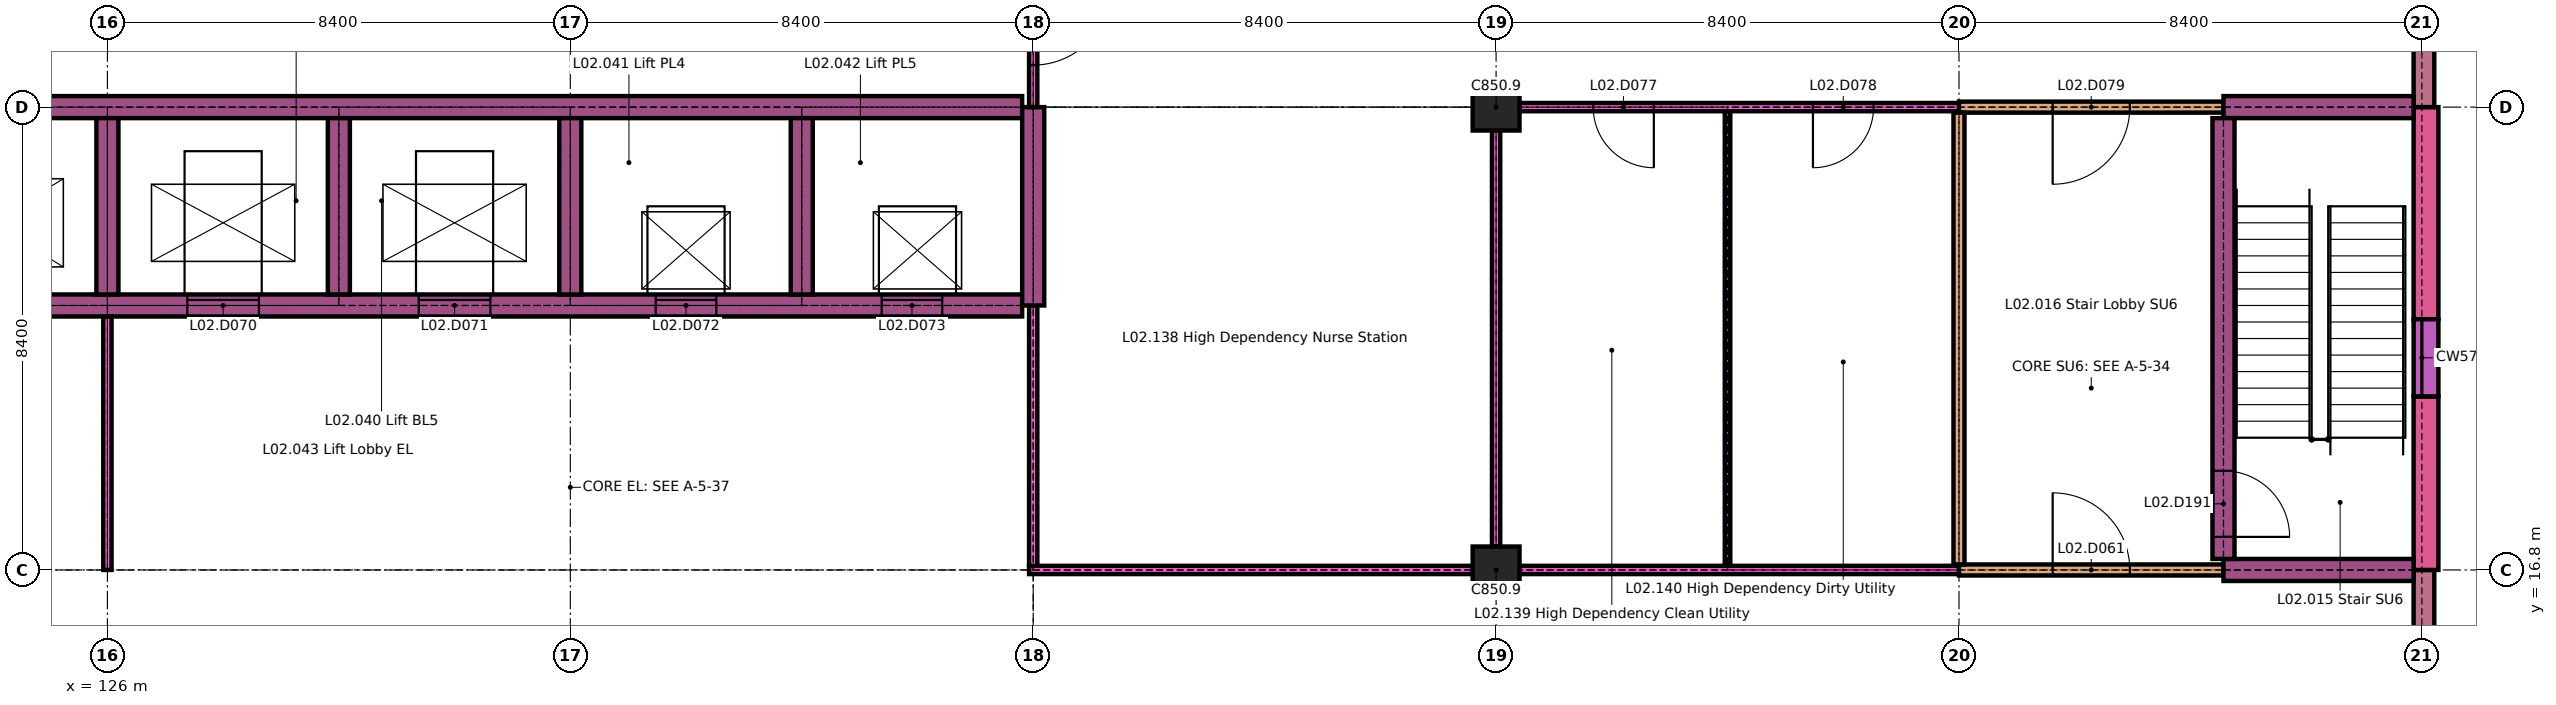
"""IFC4 building model, lengths in metres.
Left out: names, types, materials, properties, quantities, classifications, styles, units other than length and angle.
Written with IfcOpenShell. Run it as: python <this file> out.ifc"""

import sys

from ifc_helpers import new_model, si_unit, direction, frame, frame_2d, origin, origin_2d, place, context, subcontext, project, spatial, rectangle, extrude, element, fill, save


model = new_model("IFC4")
c1 = context("Model", 3, precision=1e-05, world=origin(), true_north=direction((0.0, 1.0)))
c2 = subcontext(c1, "Body", "Model", "MODEL_VIEW")
j1 = project(units=[si_unit("LENGTHUNIT", "METRE"), si_unit("PLANEANGLEUNIT", "RADIAN")], contexts=[c1])
p1 = place(None, origin())
s1 = spatial("IfcSite", under=j1, at=p1, CompositionType="ELEMENT")
p2 = place(p1, origin())
s2 = spatial("IfcBuilding", under=s1, at=p2, CompositionType="ELEMENT")
p3 = place(p2, frame((0.0, 0.0, 8.4)))
s3 = spatial("IfcBuildingStorey", under=s2, at=p3, CompositionType="ELEMENT", Elevation=8.4)
for number, where, z_axis, x_axis in (
    (1, (151.2, 16.8, 0.0), (0.0, 0.0, 1.0), (1.0, 0.0, 0.0)),
    (2, (151.2, 25.2, 0.0), (0.0, 0.0, 1.0), (1.0, 0.0, 0.0)),
):
    element("IfcColumn", number, at=place(p3, frame(where, z_axis=z_axis, x_axis=x_axis)), inside=s3, PredefinedType="COLUMN", context=c2, shape_type="SweptSolid", body=[
        extrude(rectangle(XDim=0.85, YDim=0.85, at=origin_2d()), origin(), (0.0, 0.0, 1.0), 4.2),
    ])
p4 = place(p3, frame((168.038, 13.8, 0.0), z_axis=(0.0, 0.0, 1.0), x_axis=(0.0, 1.0, 0.0)))
e3 = element("IfcWall", 3, at=p4, inside=s3, PredefinedType="SOLIDWALL", context=c2, shape_type="SweptSolid", body=[
    extrude(rectangle(XDim=3.0, YDim=0.375, at=frame_2d((1.5, 0.0))), origin(), (0.0, 0.0, 1.0), 3.9),
])
p5 = place(p4, frame((0.45, 0.0, 0.9)))
e4 = element("IfcOpeningElement", 4, at=p5, cuts=e3, PredefinedType="OPENING", context=c2, shape_type="SweptSolid", body=[
    extrude(rectangle(XDim=0.9, YDim=2.1, at=frame_2d((0.45, 1.05))), frame((0.0, 0.198, 0.0), z_axis=(0.0, -1.0, 0.0), x_axis=(1.0, 0.0, 0.0)), (0.0, 0.0, 1.0), 0.395),
])
p6 = place(p3, frame((168.075, 16.8, 0.0), z_axis=(0.0, 0.0, 1.0), x_axis=(0.0, 1.0, 0.0)))
e5 = element("IfcWall", 5, at=p6, inside=s3, PredefinedType="SOLIDWALL", context=c2, shape_type="SweptSolid", body=[
    extrude(rectangle(XDim=3.15, YDim=0.45, at=frame_2d((1.575, 0.0))), origin(), (0.0, 0.0, 1.0), 4.2),
])
p7 = place(p3, frame((168.075, 21.35, 0.0), z_axis=(0.0, 0.0, 1.0), x_axis=(0.0, 1.0, 0.0)))
e6 = element("IfcWall", 6, at=p7, inside=s3, PredefinedType="SOLIDWALL", context=c2, shape_type="SweptSolid", body=[
    extrude(rectangle(XDim=3.85, YDim=0.45, at=frame_2d((1.925, 0.0))), origin(), (0.0, 0.0, 1.0), 4.2),
])
p8 = place(p3, frame((168.075, 19.95, 0.0), z_axis=(0.0, 0.0, 1.0), x_axis=(0.0, 1.0, 0.0)))
e7 = element("IfcWall", 7, at=p8, inside=s3, PredefinedType="SOLIDWALL", context=c2, shape_type="SweptSolid", body=[
    extrude(rectangle(XDim=1.4, YDim=0.45, at=frame_2d((0.7, 0.0))), origin(), (0.0, 0.0, 1.0), 0.6),
])
p9 = place(p3, frame((168.038, 25.2, 0.0), z_axis=(0.0, 0.0, 1.0), x_axis=(0.0, 1.0, 0.0)))
e8 = element("IfcWall", 8, at=p9, inside=s3, PredefinedType="SOLIDWALL", context=c2, shape_type="SweptSolid", body=[
    extrude(rectangle(XDim=3.0, YDim=0.375, at=frame_2d((1.5, 0.0))), origin(), (0.0, 0.0, 1.0), 3.9),
])
p10 = place(p9, frame((1.65, 0.0, 0.9)))
e9 = element("IfcOpeningElement", 9, at=p10, cuts=e8, PredefinedType="OPENING", context=c2, shape_type="SweptSolid", body=[
    extrude(rectangle(XDim=0.9, YDim=2.1, at=frame_2d((0.45, 1.05))), frame((0.0, 0.198, 0.0), z_axis=(0.0, -1.0, 0.0), x_axis=(1.0, 0.0, 0.0)), (0.0, 0.0, 1.0), 0.395),
])
p11 = place(p3, frame((142.725, 16.8, 0.0), z_axis=(0.0, 0.0, 1.0), x_axis=(1.0, 0.0, 0.0)))
e10 = element("IfcWall", 10, at=p11, inside=s3, PredefinedType="PARTITIONING", context=c2, shape_type="SweptSolid", body=[
    extrude(rectangle(XDim=8.05, YDim=0.15, at=frame_2d((4.025, 0.0))), origin(), (0.0, 0.0, 1.0), 4.2),
])
p12 = place(p3, frame((151.625, 16.8, 0.0), z_axis=(0.0, 0.0, 1.0), x_axis=(1.0, 0.0, 0.0)))
e11 = element("IfcWall", 11, at=p12, inside=s3, PredefinedType="PARTITIONING", context=c2, shape_type="SweptSolid", body=[
    extrude(rectangle(XDim=7.975, YDim=0.15, at=frame_2d((3.988, 0.0))), origin(), (0.0, 0.0, 1.0), 4.2),
])
p13 = place(p3, frame((159.6, 16.8, 0.0), z_axis=(0.0, 0.0, 1.0), x_axis=(1.0, 0.0, 0.0)))
e12 = element("IfcWall", 12, at=p13, inside=s3, PredefinedType="PARTITIONING", context=c2, shape_type="SweptSolid", body=[
    extrude(rectangle(XDim=4.8, YDim=0.2, at=frame_2d((2.4, 0.0))), origin(), (0.0, 0.0, 1.0), 4.2),
])
p14 = place(p13, frame((1.7, 0.0, 0.0)))
e13 = element("IfcOpeningElement", 13, at=p14, cuts=e12, PredefinedType="OPENING", context=c2, shape_type="SweptSolid", body=[
    extrude(rectangle(XDim=1.4, YDim=2.1, at=frame_2d((0.7, 1.05))), frame((0.0, 0.11, 0.0), z_axis=(0.0, -1.0, 0.0), x_axis=(1.0, 0.0, 0.0)), (0.0, 0.0, 1.0), 0.22),
])
p15 = place(p3, frame((164.4, 16.8, 0.0), z_axis=(0.0, 0.0, 1.0), x_axis=(1.0, 0.0, 0.0)))
e14 = element("IfcWall", 14, at=p15, inside=s3, PredefinedType="SHEAR", context=c2, shape_type="SweptSolid", body=[
    extrude(rectangle(XDim=3.45, YDim=0.4, at=frame_2d((1.725, 0.0))), origin(), (0.0, 0.0, 1.0), 4.2),
])
p16 = place(p3, frame((117.8, 21.6, 0.0), z_axis=(0.0, 0.0, 1.0), x_axis=(1.0, 0.0, 0.0)))
e15 = element("IfcWall", 15, at=p16, inside=s3, PredefinedType="SHEAR", context=c2, shape_type="SweptSolid", body=[
    extrude(rectangle(XDim=24.8, YDim=0.4, at=frame_2d((12.4, 0.0))), origin(), (0.0, 0.0, 1.0), 4.2),
])
p17 = place(p16, frame((1.35, 0.0, 0.0)))
e16 = element("IfcOpeningElement", 16, at=p17, cuts=e15, PredefinedType="OPENING", context=c2, shape_type="SweptSolid", body=[
    extrude(rectangle(XDim=1.3, YDim=2.1, at=frame_2d((0.65, 1.05))), frame((0.0, 0.21, 0.0), z_axis=(0.0, -1.0, 0.0), x_axis=(1.0, 0.0, 0.0)), (0.0, 0.0, 1.0), 0.42),
])
p18 = place(p16, frame((5.45, 0.0, 0.0)))
e17 = element("IfcOpeningElement", 17, at=p18, cuts=e15, PredefinedType="OPENING", context=c2, shape_type="SweptSolid", body=[
    extrude(rectangle(XDim=1.3, YDim=2.1, at=frame_2d((0.65, 1.05))), frame((0.0, 0.21, 0.0), z_axis=(0.0, -1.0, 0.0), x_axis=(1.0, 0.0, 0.0)), (0.0, 0.0, 1.0), 0.42),
])
p19 = place(p16, frame((9.65, 0.0, 0.0)))
e18 = element("IfcOpeningElement", 18, at=p19, cuts=e15, PredefinedType="OPENING", context=c2, shape_type="SweptSolid", body=[
    extrude(rectangle(XDim=1.3, YDim=2.1, at=frame_2d((0.65, 1.05))), frame((0.0, 0.21, 0.0), z_axis=(0.0, -1.0, 0.0), x_axis=(1.0, 0.0, 0.0)), (0.0, 0.0, 1.0), 0.42),
])
p20 = place(p16, frame((13.85, 0.0, 0.0)))
e19 = element("IfcOpeningElement", 19, at=p20, cuts=e15, PredefinedType="OPENING", context=c2, shape_type="SweptSolid", body=[
    extrude(rectangle(XDim=1.3, YDim=2.1, at=frame_2d((0.65, 1.05))), frame((0.0, 0.21, 0.0), z_axis=(0.0, -1.0, 0.0), x_axis=(1.0, 0.0, 0.0)), (0.0, 0.0, 1.0), 0.42),
])
p21 = place(p16, frame((18.15, 0.0, 0.0)))
e20 = element("IfcOpeningElement", 20, at=p21, cuts=e15, PredefinedType="OPENING", context=c2, shape_type="SweptSolid", body=[
    extrude(rectangle(XDim=1.1, YDim=2.1, at=frame_2d((0.55, 1.05))), frame((0.0, 0.21, 0.0), z_axis=(0.0, -1.0, 0.0), x_axis=(1.0, 0.0, 0.0)), (0.0, 0.0, 1.0), 0.42),
])
p22 = place(p16, frame((22.25, 0.0, 0.0)))
e21 = element("IfcOpeningElement", 21, at=p22, cuts=e15, PredefinedType="OPENING", context=c2, shape_type="SweptSolid", body=[
    extrude(rectangle(XDim=1.1, YDim=2.1, at=frame_2d((0.55, 1.05))), frame((0.0, 0.21, 0.0), z_axis=(0.0, -1.0, 0.0), x_axis=(1.0, 0.0, 0.0)), (0.0, 0.0, 1.0), 0.42),
])
p23 = place(p3, frame((117.6, 25.2, 0.0), z_axis=(0.0, 0.0, 1.0), x_axis=(1.0, 0.0, 0.0)))
e22 = element("IfcWall", 22, at=p23, inside=s3, PredefinedType="SHEAR", context=c2, shape_type="SweptSolid", body=[
    extrude(rectangle(XDim=25.0, YDim=0.4, at=frame_2d((12.5, 0.0))), origin(), (0.0, 0.0, 1.0), 4.2),
])
p24 = place(p3, frame((151.625, 25.2, 0.0), z_axis=(0.0, 0.0, 1.0), x_axis=(1.0, 0.0, 0.0)))
e23 = element("IfcWall", 23, at=p24, inside=s3, PredefinedType="PARTITIONING", context=c2, shape_type="SweptSolid", body=[
    extrude(rectangle(XDim=7.975, YDim=0.15, at=frame_2d((3.988, 0.0))), origin(), (0.0, 0.0, 1.0), 4.2),
])
p25 = place(p24, frame((1.337, 0.0, 0.0)))
e24 = element("IfcOpeningElement", 24, at=p25, cuts=e23, PredefinedType="OPENING", context=c2, shape_type="SweptSolid", body=[
    extrude(rectangle(XDim=1.1, YDim=2.1, at=frame_2d((0.55, 1.05))), frame((0.0, 0.085, 0.0), z_axis=(0.0, -1.0, 0.0), x_axis=(1.0, 0.0, 0.0)), (0.0, 0.0, 1.0), 0.17),
])
p26 = place(p24, frame((5.325, 0.0, 0.0)))
e25 = element("IfcOpeningElement", 25, at=p26, cuts=e23, PredefinedType="OPENING", context=c2, shape_type="SweptSolid", body=[
    extrude(rectangle(XDim=1.1, YDim=2.1, at=frame_2d((0.55, 1.05))), frame((0.0, 0.085, 0.0), z_axis=(0.0, -1.0, 0.0), x_axis=(1.0, 0.0, 0.0)), (0.0, 0.0, 1.0), 0.17),
])
p27 = place(p3, frame((159.6, 25.2, 0.0), z_axis=(0.0, 0.0, 1.0), x_axis=(1.0, 0.0, 0.0)))
e26 = element("IfcWall", 26, at=p27, inside=s3, PredefinedType="PARTITIONING", context=c2, shape_type="SweptSolid", body=[
    extrude(rectangle(XDim=4.8, YDim=0.2, at=frame_2d((2.4, 0.0))), origin(), (0.0, 0.0, 1.0), 4.2),
])
p28 = place(p27, frame((1.7, 0.0, 0.0)))
e27 = element("IfcOpeningElement", 27, at=p28, cuts=e26, PredefinedType="OPENING", context=c2, shape_type="SweptSolid", body=[
    extrude(rectangle(XDim=1.4, YDim=2.1, at=frame_2d((0.7, 1.05))), frame((0.0, 0.11, 0.0), z_axis=(0.0, -1.0, 0.0), x_axis=(1.0, 0.0, 0.0)), (0.0, 0.0, 1.0), 0.22),
])
p29 = place(p3, frame((164.4, 25.2, 0.0), z_axis=(0.0, 0.0, 1.0), x_axis=(1.0, 0.0, 0.0)))
e28 = element("IfcWall", 28, at=p29, inside=s3, PredefinedType="SHEAR", context=c2, shape_type="SweptSolid", body=[
    extrude(rectangle(XDim=3.45, YDim=0.4, at=frame_2d((1.725, 0.0))), origin(), (0.0, 0.0, 1.0), 4.2),
])
p30 = place(p3, frame((126.0, 16.8, 0.0), z_axis=(0.0, 0.0, 1.0), x_axis=(0.0, 1.0, 0.0)))
e29 = element("IfcWall", 29, at=p30, inside=s3, PredefinedType="PARTITIONING", context=c2, shape_type="SweptSolid", body=[
    extrude(rectangle(XDim=4.6, YDim=0.15, at=frame_2d((2.3, 0.0))), origin(), (0.0, 0.0, 1.0), 4.2),
])
for number, where, z_axis, x_axis in (
    (30, (126.0, 21.8, 0.0), (0.0, 0.0, 1.0), (0.0, 1.0, 0.0)),
    (31, (130.2, 21.8, 0.0), (0.0, 0.0, 1.0), (0.0, 1.0, 0.0)),
    (32, (134.4, 21.8, 0.0), (0.0, 0.0, 1.0), (0.0, 1.0, 0.0)),
    (33, (138.6, 21.8, 0.0), (0.0, 0.0, 1.0), (0.0, 1.0, 0.0)),
):
    element("IfcWall", number, at=place(p3, frame(where, z_axis=z_axis, x_axis=x_axis)), inside=s3, PredefinedType="SHEAR", context=c2, shape_type="SweptSolid", body=[
        extrude(rectangle(XDim=3.2, YDim=0.4, at=frame_2d((1.6, 0.0))), origin(), (0.0, 0.0, 1.0), 4.2),
    ])
p31 = place(p3, frame((142.8, 16.875, 0.0), z_axis=(0.0, 0.0, 1.0), x_axis=(0.0, 1.0, 0.0)))
e34 = element("IfcWall", 34, at=p31, inside=s3, PredefinedType="PARTITIONING", context=c2, shape_type="SweptSolid", body=[
    extrude(rectangle(XDim=4.725, YDim=0.15, at=frame_2d((2.363, 0.0))), origin(), (0.0, 0.0, 1.0), 4.2),
])
p32 = place(p3, frame((142.8, 21.6, 0.0), z_axis=(0.0, 0.0, 1.0), x_axis=(0.0, 1.0, 0.0)))
e35 = element("IfcWall", 35, at=p32, inside=s3, PredefinedType="SHEAR", context=c2, shape_type="SweptSolid", body=[
    extrude(rectangle(XDim=3.6, YDim=0.4, at=frame_2d((1.8, 0.0))), origin(), (0.0, 0.0, 1.0), 4.2),
])
p33 = place(p3, frame((142.8, 25.2, 0.0), z_axis=(0.0, 0.0, 1.0), x_axis=(0.0, 1.0, 0.0)))
e36 = element("IfcWall", 36, at=p33, inside=s3, PredefinedType="PARTITIONING", context=c2, shape_type="SweptSolid", body=[
    extrude(rectangle(XDim=2.925, YDim=0.15, at=frame_2d((1.462, 0.0))), origin(), (0.0, 0.0, 1.0), 4.2),
])
p34 = place(p33, frame((0.762, 0.0, 0.0)))
e37 = element("IfcOpeningElement", 37, at=p34, cuts=e36, PredefinedType="OPENING", context=c2, shape_type="SweptSolid", body=[
    extrude(rectangle(XDim=1.4, YDim=2.1, at=frame_2d((0.7, 1.05))), frame((0.0, 0.085, 0.0), z_axis=(0.0, -1.0, 0.0), x_axis=(1.0, 0.0, 0.0)), (0.0, 0.0, 1.0), 0.17),
])
p35 = place(p3, frame((151.2, 17.225, 0.0), z_axis=(0.0, 0.0, 1.0), x_axis=(0.0, 1.0, 0.0)))
e38 = element("IfcWall", 38, at=p35, inside=s3, PredefinedType="PARTITIONING", context=c2, shape_type="SweptSolid", body=[
    extrude(rectangle(XDim=7.55, YDim=0.15, at=frame_2d((3.775, 0.0))), origin(), (0.0, 0.0, 1.0), 4.2),
])
p36 = place(p3, frame((155.4, 16.875, 0.0), z_axis=(0.0, 0.0, 1.0), x_axis=(0.0, 1.0, 0.0)))
e39 = element("IfcWall", 39, at=p36, inside=s3, PredefinedType="PARTITIONING", context=c2, shape_type="SweptSolid", body=[
    extrude(rectangle(XDim=8.25, YDim=0.1, at=frame_2d((4.125, 0.0))), origin(), (0.0, 0.0, 1.0), 4.2),
])
p37 = place(p3, frame((159.6, 16.9, 0.0), z_axis=(0.0, 0.0, 1.0), x_axis=(0.0, 1.0, 0.0)))
e40 = element("IfcWall", 40, at=p37, inside=s3, PredefinedType="PARTITIONING", context=c2, shape_type="SweptSolid", body=[
    extrude(rectangle(XDim=8.2, YDim=0.2, at=frame_2d((4.1, 0.0))), origin(), (0.0, 0.0, 1.0), 4.2),
])
p38 = place(p3, frame((164.4, 17.0, 0.0), z_axis=(0.0, 0.0, 1.0), x_axis=(0.0, 1.0, 0.0)))
e41 = element("IfcWall", 41, at=p38, inside=s3, PredefinedType="SHEAR", context=c2, shape_type="SweptSolid", body=[
    extrude(rectangle(XDim=8.0, YDim=0.4, at=frame_2d((4.0, 0.0))), origin(), (0.0, 0.0, 1.0), 4.2),
])
p39 = place(p38, frame((0.4, 0.0, 0.0)))
e42 = element("IfcOpeningElement", 42, at=p39, cuts=e41, PredefinedType="OPENING", context=c2, shape_type="SweptSolid", body=[
    extrude(rectangle(XDim=1.2, YDim=2.1, at=frame_2d((0.6, 1.05))), frame((0.0, 0.21, 0.0), z_axis=(0.0, -1.0, 0.0), x_axis=(1.0, 0.0, 0.0)), (0.0, 0.0, 1.0), 0.42),
])
p40 = place(p14, origin())
e43 = element("IfcDoor", 43, at=p40, inside=s3, OperationType="SINGLE_SWING_RIGHT", PredefinedType="DOOR", context=c2, shape_type="SweptSolid", body=[
    extrude(rectangle(XDim=1.4, YDim=2.1, at=frame_2d((0.7, 1.05))), frame((0.0, 0.03, 0.0), z_axis=(0.0, -1.0, 0.0), x_axis=(1.0, 0.0, 0.0)), (0.0, 0.0, 1.0), 0.06),
])
fill(e13, e43)
p41 = place(p19, origin())
e44 = element("IfcDoor", 44, at=p41, inside=s3, OperationType="SLIDING_TO_LEFT", PredefinedType="DOOR", context=c2, shape_type="SweptSolid", body=[
    extrude(rectangle(XDim=1.3, YDim=2.1, at=frame_2d((0.65, 1.05))), frame((0.0, 0.025, 0.0), z_axis=(0.0, -1.0, 0.0), x_axis=(1.0, 0.0, 0.0)), (0.0, 0.0, 1.0), 0.05),
])
fill(e18, e44)
p42 = place(p20, origin())
e45 = element("IfcDoor", 45, at=p42, inside=s3, OperationType="SLIDING_TO_LEFT", PredefinedType="DOOR", context=c2, shape_type="SweptSolid", body=[
    extrude(rectangle(XDim=1.3, YDim=2.1, at=frame_2d((0.65, 1.05))), frame((0.0, 0.025, 0.0), z_axis=(0.0, -1.0, 0.0), x_axis=(1.0, 0.0, 0.0)), (0.0, 0.0, 1.0), 0.05),
])
fill(e19, e45)
p43 = place(p21, origin())
e46 = element("IfcDoor", 46, at=p43, inside=s3, OperationType="SLIDING_TO_LEFT", PredefinedType="DOOR", context=c2, shape_type="SweptSolid", body=[
    extrude(rectangle(XDim=1.1, YDim=2.1, at=frame_2d((0.55, 1.05))), frame((0.0, 0.025, 0.0), z_axis=(0.0, -1.0, 0.0), x_axis=(1.0, 0.0, 0.0)), (0.0, 0.0, 1.0), 0.05),
])
fill(e20, e46)
p44 = place(p22, origin())
e47 = element("IfcDoor", 47, at=p44, inside=s3, OperationType="SLIDING_TO_LEFT", PredefinedType="DOOR", context=c2, shape_type="SweptSolid", body=[
    extrude(rectangle(XDim=1.1, YDim=2.1, at=frame_2d((0.55, 1.05))), frame((0.0, 0.025, 0.0), z_axis=(0.0, -1.0, 0.0), x_axis=(1.0, 0.0, 0.0)), (0.0, 0.0, 1.0), 0.05),
])
fill(e21, e47)
p45 = place(p25, origin())
e48 = element("IfcDoor", 48, at=p45, inside=s3, OperationType="SINGLE_SWING_RIGHT", PredefinedType="DOOR", context=c2, shape_type="SweptSolid", body=[
    extrude(rectangle(XDim=1.1, YDim=2.1, at=frame_2d((0.55, 1.05))), frame((0.0, 0.025, 0.0), z_axis=(0.0, -1.0, 0.0), x_axis=(1.0, 0.0, 0.0)), (0.0, 0.0, 1.0), 0.05),
])
fill(e24, e48)
p46 = place(p26, origin())
e49 = element("IfcDoor", 49, at=p46, inside=s3, OperationType="SINGLE_SWING_LEFT", PredefinedType="DOOR", context=c2, shape_type="SweptSolid", body=[
    extrude(rectangle(XDim=1.1, YDim=2.1, at=frame_2d((0.55, 1.05))), frame((0.0, 0.025, 0.0), z_axis=(0.0, -1.0, 0.0), x_axis=(1.0, 0.0, 0.0)), (0.0, 0.0, 1.0), 0.05),
])
fill(e25, e49)
p47 = place(p28, origin())
e50 = element("IfcDoor", 50, at=p47, inside=s3, OperationType="SINGLE_SWING_LEFT", PredefinedType="DOOR", context=c2, shape_type="SweptSolid", body=[
    extrude(rectangle(XDim=1.4, YDim=2.1, at=frame_2d((0.7, 1.05))), frame((0.0, 0.03, 0.0), z_axis=(0.0, -1.0, 0.0), x_axis=(1.0, 0.0, 0.0)), (0.0, 0.0, 1.0), 0.06),
])
fill(e27, e50)
p48 = place(p34, origin())
e51 = element("IfcDoor", 51, at=p48, inside=s3, OperationType="SINGLE_SWING_RIGHT", PredefinedType="DOOR", context=c2, shape_type="SweptSolid", body=[
    extrude(rectangle(XDim=1.4, YDim=2.1, at=frame_2d((0.7, 1.05))), frame((0.0, 0.025, 0.0), z_axis=(0.0, -1.0, 0.0), x_axis=(1.0, 0.0, 0.0)), (0.0, 0.0, 1.0), 0.05),
])
fill(e37, e51)
p49 = place(p39, origin())
e52 = element("IfcDoor", 52, at=p49, inside=s3, OperationType="SINGLE_SWING_LEFT", PredefinedType="DOOR", context=c2, shape_type="SweptSolid", body=[
    extrude(rectangle(XDim=1.2, YDim=2.1, at=frame_2d((0.6, 1.05))), frame((0.0, 0.025, 0.0), z_axis=(0.0, -1.0, 0.0), x_axis=(1.0, 0.0, 0.0)), (0.0, 0.0, 1.0), 0.05),
])
fill(e42, e52)
save(model, sys.argv[1])
